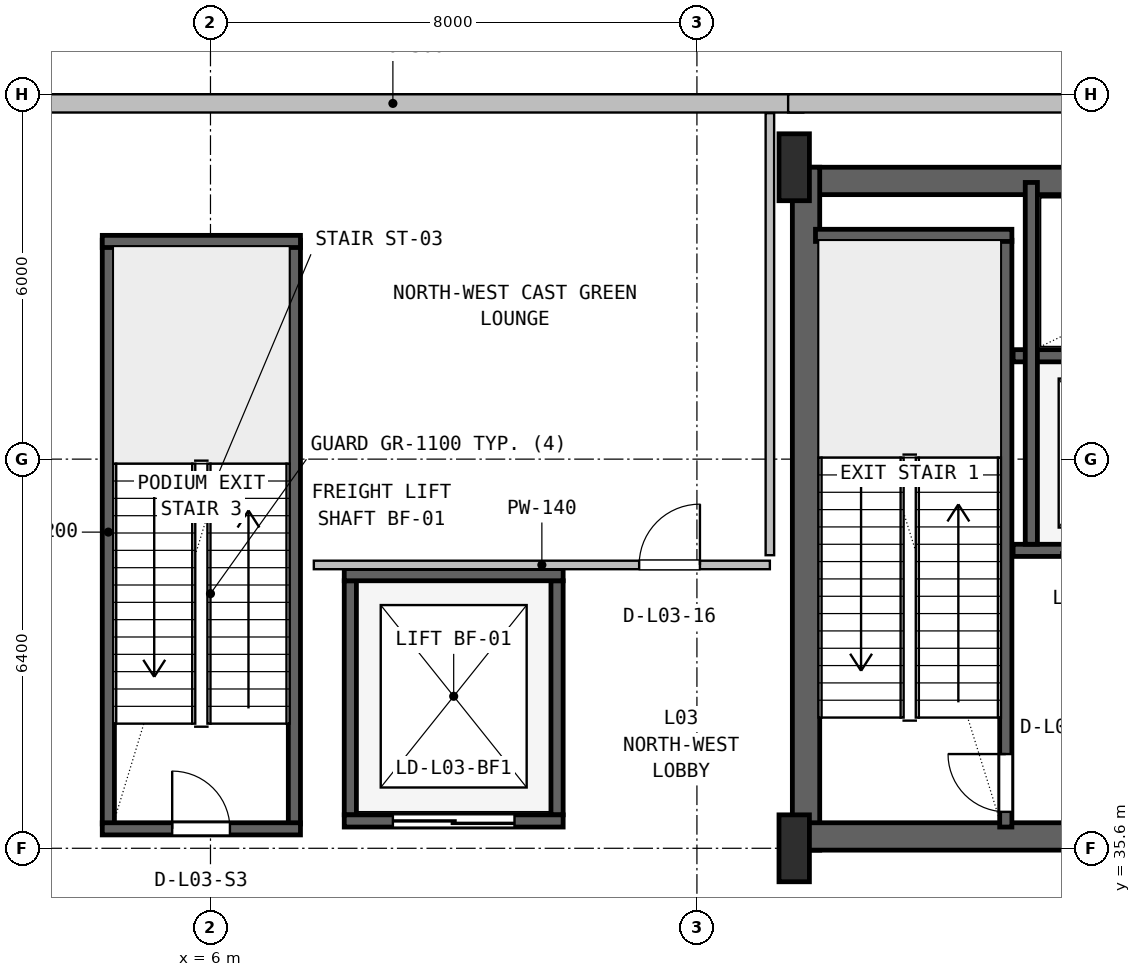
"""IFC4 building model, lengths in metres.
Left out: names, types, materials, properties, quantities, classifications, styles, units other than length and angle.
Written with IfcOpenShell. Run it as: python <this file> out.ifc"""

import sys

from ifc_helpers import new_model, si_unit, direction, frame, frame_2d, origin, origin_2d, place, context, subcontext, project, spatial, rectangle, i_section, extrude, source, transform, mapped, element, fill, save


model = new_model("IFC4")
c1 = context("Model", 3, precision=1e-05, world=origin(), true_north=direction((0.0, 1.0)))
c2 = subcontext(c1, "Body", "Model", "MODEL_VIEW")
j1 = project(units=[si_unit("LENGTHUNIT", "METRE"), si_unit("PLANEANGLEUNIT", "RADIAN")], contexts=[c1])
p1 = place(None, origin())
s1 = spatial("IfcSite", under=j1, at=p1, CompositionType="ELEMENT")
p2 = place(p1, origin())
s2 = spatial("IfcBuilding", under=s1, at=p2, CompositionType="ELEMENT")
p3 = place(p2, frame((0.0, 0.0, 16.8)))
s3 = spatial("IfcBuildingStorey", under=s2, at=p3, CompositionType="ELEMENT", Elevation=16.8)
p4 = place(p3, frame((15.6, 46.575, 0.0), z_axis=(0.0, 0.0, 1.0), x_axis=(1.0, 0.0, 0.0)))
e1 = element("IfcWall", 1, at=p4, inside=s3, PredefinedType="SHEAR", context=c2, shape_type="SweptSolid", body=[
    extrude(rectangle(XDim=36.8, YDim=0.45, at=frame_2d((18.4, 0.0))), origin(), (0.0, 0.0, 1.0), 5.08),
])
p5 = place(p3, frame((15.795, 35.57, 0.0), z_axis=(0.0, 0.0, 1.0), x_axis=(0.0, 1.0, 0.0)))
e2 = element("IfcWall", 2, at=p5, inside=s3, PredefinedType="SHEAR", context=c2, shape_type="SweptSolid", body=[
    extrude(rectangle(XDim=11.23, YDim=0.45, at=frame_2d((5.615, 0.0))), origin(), (0.0, 0.0, 1.0), 5.08),
])
p6 = place(p3, frame((15.57, 35.795, 0.0), z_axis=(0.0, 0.0, 1.0), x_axis=(1.0, 0.0, 0.0)))
e3 = element("IfcWall", 3, at=p6, inside=s3, PredefinedType="SHEAR", context=c2, shape_type="SweptSolid", body=[
    extrude(rectangle(XDim=9.23, YDim=0.45, at=frame_2d((4.615, 0.0))), origin(), (0.0, 0.0, 1.0), 5.08),
])
p7 = place(p6, frame((5.4, 0.0, 0.0)))
e4 = element("IfcOpeningElement", 4, at=p7, cuts=e3, PredefinedType="OPENING", context=c2, shape_type="SweptSolid", body=[
    extrude(rectangle(XDim=1.0, YDim=2.1, at=frame_2d((0.5, 1.05))), frame((0.0, 0.235, 0.0), z_axis=(0.0, -1.0, 0.0), x_axis=(1.0, 0.0, 0.0)), (0.0, 0.0, 1.0), 0.47),
])
m1 = source(origin(), c2, "Body", "SweptSolid", [
    extrude(i_section(OverallWidth=0.5, OverallDepth=1.1, WebThickness=0.018, FlangeThickness=0.032, FilletRadius=0.018, at=origin_2d()), origin(), (0.0, 0.0, 1.0), 5.4),
])
for number, where, z_axis, x_axis in (
    (5, (15.6, 35.6, 0.0), (0.0, 0.0, 1.0), (1.0, 0.0, 0.0)),
    (6, (15.6, 46.8, 0.0), (0.0, 0.0, 1.0), (1.0, 0.0, 0.0)),
):
    element("IfcColumn", number, at=place(p3, frame(where, z_axis=z_axis, x_axis=x_axis)), inside=s3, PredefinedType="COLUMN", context=c2, shape_type="MappedRepresentation", body=[
        mapped(m1, transform((0.0, 0.0, 0.0), x_axis=(1.0, 0.0, 0.0), y_axis=(0.0, 1.0, 0.0), z_axis=(0.0, 0.0, 1.0), scale=1.0)),
    ])
p8 = place(p3, frame((2.25, 47.85, 0.0), z_axis=(0.0, 0.0, 1.0), x_axis=(1.0, 0.0, 0.0)))
e7 = element("IfcWall", 7, at=p8, inside=s3, PredefinedType="SOLIDWALL", context=c2, shape_type="SweptSolid", body=[
    extrude(rectangle(XDim=13.5, YDim=0.3, at=frame_2d((6.75, 0.0))), origin(), (0.0, 0.0, 1.0), 5.06),
])
p9 = place(p3, frame((15.5, 47.85, 0.0), z_axis=(0.0, 0.0, 1.0), x_axis=(1.0, 0.0, 0.0)))
e8 = element("IfcWall", 8, at=p9, inside=s3, PredefinedType="SOLIDWALL", context=c2, shape_type="SweptSolid", body=[
    extrude(rectangle(XDim=37.0, YDim=0.3, at=frame_2d((18.5, 0.0))), origin(), (0.0, 0.0, 1.0), 5.06),
])
p10 = place(p3, frame((19.08, 35.95, 0.0), z_axis=(0.0, 0.0, 1.0), x_axis=(0.0, 1.0, 0.0)))
e9 = element("IfcWall", 9, at=p10, inside=s3, PredefinedType="SHEAR", context=c2, shape_type="SweptSolid", body=[
    extrude(rectangle(XDim=9.65, YDim=0.2, at=frame_2d((4.825, 0.0))), origin(), (0.0, 0.0, 1.0), 5.08),
])
p11 = place(p10, frame((0.25, 0.0, 0.0)))
e10 = element("IfcOpeningElement", 10, at=p11, cuts=e9, PredefinedType="OPENING", context=c2, shape_type="SweptSolid", body=[
    extrude(rectangle(XDim=0.95, YDim=2.1, at=frame_2d((0.475, 1.05))), frame((0.0, 0.11, 0.0), z_axis=(0.0, -1.0, 0.0), x_axis=(1.0, 0.0, 0.0)), (0.0, 0.0, 1.0), 0.22),
])
p12 = place(p3, frame((15.95, 45.68, 0.0), z_axis=(0.0, 0.0, 1.0), x_axis=(1.0, 0.0, 0.0)))
e11 = element("IfcWall", 11, at=p12, inside=s3, PredefinedType="SHEAR", context=c2, shape_type="SweptSolid", body=[
    extrude(rectangle(XDim=3.23, YDim=0.2, at=frame_2d((1.615, 0.0))), origin(), (0.0, 0.0, 1.0), 5.08),
])
p13 = place(p3, frame((19.2, 40.5, 0.0), z_axis=(0.0, 0.0, 1.0), x_axis=(1.0, 0.0, 0.0)))
e12 = element("IfcWall", 12, at=p13, inside=s3, PredefinedType="SHEAR", context=c2, shape_type="SweptSolid", body=[
    extrude(rectangle(XDim=5.52, YDim=0.2, at=frame_2d((2.76, 0.0))), origin(), (0.0, 0.0, 1.0), 5.08),
])
p14 = place(p13, frame((1.05, 0.0, 0.0)))
e13 = element("IfcOpeningElement", 13, at=p14, cuts=e12, PredefinedType="OPENING", context=c2, shape_type="SweptSolid", body=[
    extrude(rectangle(XDim=1.1, YDim=2.18, at=frame_2d((0.55, 1.09))), frame((0.0, 0.11, 0.0), z_axis=(0.0, -1.0, 0.0), x_axis=(1.0, 0.0, 0.0)), (0.0, 0.0, 1.0), 0.22),
])
p15 = place(p13, frame((3.65, 0.0, 0.0)))
e14 = element("IfcOpeningElement", 14, at=p15, cuts=e12, PredefinedType="OPENING", context=c2, shape_type="SweptSolid", body=[
    extrude(rectangle(XDim=1.1, YDim=2.18, at=frame_2d((0.55, 1.09))), frame((0.0, 0.11, 0.0), z_axis=(0.0, -1.0, 0.0), x_axis=(1.0, 0.0, 0.0)), (0.0, 0.0, 1.0), 0.22),
])
p16 = place(p3, frame((19.2, 43.7, 0.0), z_axis=(0.0, 0.0, 1.0), x_axis=(1.0, 0.0, 0.0)))
e15 = element("IfcWall", 15, at=p16, inside=s3, PredefinedType="SHEAR", context=c2, shape_type="SweptSolid", body=[
    extrude(rectangle(XDim=5.52, YDim=0.2, at=frame_2d((2.76, 0.0))), origin(), (0.0, 0.0, 1.0), 5.08),
])
p17 = place(p3, frame((19.5, 40.6, 0.0), z_axis=(0.0, 0.0, 1.0), x_axis=(0.0, 1.0, 0.0)))
e16 = element("IfcWall", 16, at=p17, inside=s3, PredefinedType="SHEAR", context=c2, shape_type="SweptSolid", body=[
    extrude(rectangle(XDim=5.95, YDim=0.2, at=frame_2d((2.975, 0.0))), origin(), (0.0, 0.0, 1.0), 5.08),
])
for number, where, z_axis, x_axis in (
    (17, (4.32, 36.0, 0.0), (0.0, 0.0, 1.0), (0.0, 1.0, 0.0)),
    (18, (7.38, 36.0, 0.0), (0.0, 0.0, 1.0), (0.0, 1.0, 0.0)),
):
    element("IfcWall", number, at=place(p3, frame(where, z_axis=z_axis, x_axis=x_axis)), inside=s3, PredefinedType="SHEAR", context=c2, shape_type="SweptSolid", body=[
        extrude(rectangle(XDim=9.6, YDim=0.2, at=frame_2d((4.8, 0.0))), origin(), (0.0, 0.0, 1.0), 5.08),
    ])
p18 = place(p3, frame((4.22, 45.58, 0.0), z_axis=(0.0, 0.0, 1.0), x_axis=(1.0, 0.0, 0.0)))
e19 = element("IfcWall", 19, at=p18, inside=s3, PredefinedType="SHEAR", context=c2, shape_type="SweptSolid", body=[
    extrude(rectangle(XDim=3.26, YDim=0.2, at=frame_2d((1.63, 0.0))), origin(), (0.0, 0.0, 1.0), 5.08),
])
p19 = place(p3, frame((4.22, 35.92, 0.0), z_axis=(0.0, 0.0, 1.0), x_axis=(1.0, 0.0, 0.0)))
e20 = element("IfcWall", 20, at=p19, inside=s3, PredefinedType="SHEAR", context=c2, shape_type="SweptSolid", body=[
    extrude(rectangle(XDim=3.26, YDim=0.2, at=frame_2d((1.63, 0.0))), origin(), (0.0, 0.0, 1.0), 5.08),
])
p20 = place(p19, frame((1.15, 0.0, 0.0)))
e21 = element("IfcOpeningElement", 21, at=p20, cuts=e20, PredefinedType="OPENING", context=c2, shape_type="SweptSolid", body=[
    extrude(rectangle(XDim=0.95, YDim=2.1, at=frame_2d((0.475, 1.05))), frame((0.0, 0.11, 0.0), z_axis=(0.0, -1.0, 0.0), x_axis=(1.0, 0.0, 0.0)), (0.0, 0.0, 1.0), 0.22),
])
for number, where, z_axis, x_axis in (
    (22, (8.3, 36.15, 0.0), (0.0, 0.0, 1.0), (0.0, 1.0, 0.0)),
    (23, (11.7, 36.15, 0.0), (0.0, 0.0, 1.0), (0.0, 1.0, 0.0)),
):
    element("IfcWall", number, at=place(p3, frame(where, z_axis=z_axis, x_axis=x_axis)), inside=s3, PredefinedType="SHEAR", context=c2, shape_type="SweptSolid", body=[
        extrude(rectangle(XDim=3.85, YDim=0.2, at=frame_2d((1.925, 0.0))), origin(), (0.0, 0.0, 1.0), 5.08),
    ])
p21 = place(p3, frame((8.2, 40.1, 0.0), z_axis=(0.0, 0.0, 1.0), x_axis=(1.0, 0.0, 0.0)))
e24 = element("IfcWall", 24, at=p21, inside=s3, PredefinedType="SHEAR", context=c2, shape_type="SweptSolid", body=[
    extrude(rectangle(XDim=3.6, YDim=0.2, at=frame_2d((1.8, 0.0))), origin(), (0.0, 0.0, 1.0), 5.08),
])
p22 = place(p3, frame((8.2, 36.05, 0.0), z_axis=(0.0, 0.0, 1.0), x_axis=(1.0, 0.0, 0.0)))
e25 = element("IfcWall", 25, at=p22, inside=s3, PredefinedType="SHEAR", context=c2, shape_type="SweptSolid", body=[
    extrude(rectangle(XDim=3.6, YDim=0.2, at=frame_2d((1.8, 0.0))), origin(), (0.0, 0.0, 1.0), 5.08),
])
p23 = place(p22, frame((0.8, 0.0, 0.0)))
e26 = element("IfcOpeningElement", 26, at=p23, cuts=e25, PredefinedType="OPENING", context=c2, shape_type="SweptSolid", body=[
    extrude(rectangle(XDim=2.0, YDim=2.28, at=frame_2d((1.0, 1.14))), frame((0.0, 0.11, 0.0), z_axis=(0.0, -1.0, 0.0), x_axis=(1.0, 0.0, 0.0)), (0.0, 0.0, 1.0), 0.22),
])
p24 = place(p3, frame((7.7, 40.26, 0.0), z_axis=(0.0, 0.0, 1.0), x_axis=(1.0, 0.0, 0.0)))
e27 = element("IfcWall", 27, at=p24, inside=s3, PredefinedType="PARTITIONING", context=c2, shape_type="SweptSolid", body=[
    extrude(rectangle(XDim=7.5, YDim=0.14, at=frame_2d((3.75, 0.0))), origin(), (0.0, 0.0, 1.0), 5.06),
])
p25 = place(p24, frame((5.35, 0.0, 0.0)))
e28 = element("IfcOpeningElement", 28, at=p25, cuts=e27, PredefinedType="OPENING", context=c2, shape_type="SweptSolid", body=[
    extrude(rectangle(XDim=1.0, YDim=2.1, at=frame_2d((0.5, 1.05))), frame((0.0, 0.08, 0.0), z_axis=(0.0, -1.0, 0.0), x_axis=(1.0, 0.0, 0.0)), (0.0, 0.0, 1.0), 0.16),
])
p26 = place(p3, frame((15.2, 40.42, 0.0), z_axis=(0.0, 0.0, 1.0), x_axis=(0.0, 1.0, 0.0)))
e29 = element("IfcWall", 29, at=p26, inside=s3, PredefinedType="PARTITIONING", context=c2, shape_type="SweptSolid", body=[
    extrude(rectangle(XDim=7.27, YDim=0.14, at=frame_2d((3.635, 0.0))), origin(), (0.0, 0.0, 1.0), 4.143),
])
m2 = source(origin(), c2, "Body", "SweptSolid", [
    extrude(rectangle(XDim=0.95, YDim=2.1, at=frame_2d((0.475, 1.05))), frame((0.0, 0.025, 0.0), z_axis=(0.0, -1.0, 0.0), x_axis=(1.0, 0.0, 0.0)), (0.0, 0.0, 1.0), 0.05),
])
p27 = place(p11, origin())
e30 = element("IfcDoor", 30, at=p27, inside=s3, OperationType="SINGLE_SWING_RIGHT", PredefinedType="DOOR", context=c2, shape_type="MappedRepresentation", body=[
    mapped(m2, transform((0.0, 0.0, 0.0), x_axis=(1.0, 0.0, 0.0), y_axis=(0.0, 1.0, 0.0), z_axis=(0.0, 0.0, 1.0), scale=1.0)),
])
fill(e10, e30)
p28 = place(p20, origin())
e31 = element("IfcDoor", 31, at=p28, inside=s3, OperationType="SINGLE_SWING_LEFT", PredefinedType="DOOR", context=c2, shape_type="MappedRepresentation", body=[
    mapped(m2, transform((0.0, 0.0, 0.0), x_axis=(1.0, 0.0, 0.0), y_axis=(0.0, 1.0, 0.0), z_axis=(0.0, 0.0, 1.0), scale=1.0)),
])
fill(e21, e31)
m3 = source(origin(), c2, "Body", "SweptSolid", [
    extrude(rectangle(XDim=2.0, YDim=2.28, at=frame_2d((1.0, 1.14))), frame((0.0, 0.025, 0.0), z_axis=(0.0, -1.0, 0.0), x_axis=(1.0, 0.0, 0.0)), (0.0, 0.0, 1.0), 0.05),
])
p29 = place(p23, frame((2.0, 0.0, 0.0), z_axis=(0.0, 0.0, 1.0), x_axis=(-1.0, 0.0, 0.0)))
e32 = element("IfcDoor", 32, at=p29, inside=s3, OperationType="DOUBLE_DOOR_SLIDING", PredefinedType="DOOR", context=c2, shape_type="MappedRepresentation", body=[
    mapped(m3, transform((0.0, 0.0, 0.0), x_axis=(1.0, 0.0, 0.0), y_axis=(0.0, 1.0, 0.0), z_axis=(0.0, 0.0, 1.0), scale=1.0)),
])
fill(e26, e32)
m4 = source(origin(), c2, "Body", "SweptSolid", [
    extrude(rectangle(XDim=1.0, YDim=2.1, at=frame_2d((0.5, 1.05))), frame((0.0, 0.025, 0.0), z_axis=(0.0, -1.0, 0.0), x_axis=(1.0, 0.0, 0.0)), (0.0, 0.0, 1.0), 0.05),
])
p30 = place(p25, origin())
e33 = element("IfcDoor", 33, at=p30, inside=s3, OperationType="SINGLE_SWING_RIGHT", PredefinedType="DOOR", context=c2, shape_type="MappedRepresentation", body=[
    mapped(m4, transform((0.0, 0.0, 0.0), x_axis=(1.0, 0.0, 0.0), y_axis=(0.0, 1.0, 0.0), z_axis=(0.0, 0.0, 1.0), scale=1.0)),
])
fill(e28, e33)
save(model, sys.argv[1])
